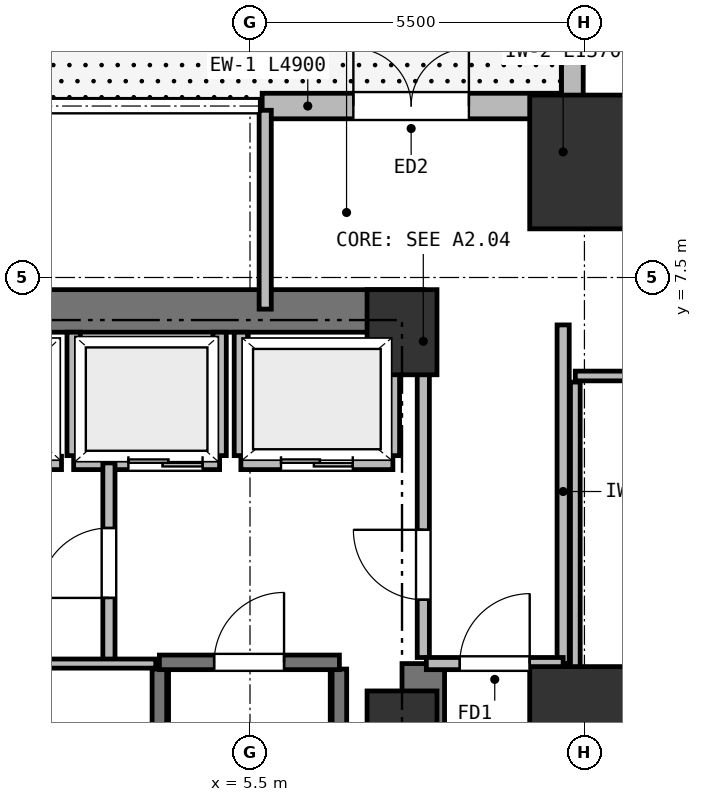
"""IFC4 building model, lengths in metres.
Left out: names, types, materials, properties, quantities, classifications, styles, units other than length and angle.
Written with IfcOpenShell. Run it as: python <this file> out.ifc"""

import sys

from ifc_helpers import new_model, si_unit, direction, frame, frame_2d, origin, origin_2d, place, context, subcontext, project, spatial, rectangle, extrude, element, fill, save


model = new_model("IFC4")
c1 = context("Model", 3, precision=1e-05, world=origin(), true_north=direction((0.0, 1.0)))
c2 = subcontext(c1, "Body", "Model", "MODEL_VIEW")
j1 = project(units=[si_unit("LENGTHUNIT", "METRE"), si_unit("PLANEANGLEUNIT", "RADIAN")], contexts=[c1])
p1 = place(None, origin())
s1 = spatial("IfcSite", under=j1, at=p1, CompositionType="ELEMENT")
p2 = place(p1, origin())
s2 = spatial("IfcBuilding", under=s1, at=p2, CompositionType="ELEMENT")
p3 = place(p2, origin())
s3 = spatial("IfcBuildingStorey", under=s2, at=p3, CompositionType="ELEMENT", Elevation=0.0)
for number, where, z_axis, x_axis in (
    (1, (8.0, 0.0, 0.0), (0.0, 0.0, 1.0), (1.0, 0.0, 0.0)),
    (2, (8.0, 6.6, 0.0), (0.0, 0.0, 1.0), (1.0, 0.0, 0.0)),
):
    element("IfcColumn", number, at=place(p3, frame(where, z_axis=z_axis, x_axis=x_axis)), inside=s3, PredefinedType="COLUMN", context=c2, shape_type="SweptSolid", body=[
        extrude(rectangle(XDim=1.15, YDim=1.4, at=origin_2d()), origin(), (0.0, 0.0, 1.0), 6.0),
    ])
p4 = place(p3, frame((-8.35, 6.95, 0.0), z_axis=(0.0, 0.0, 1.0), x_axis=(1.0, 0.0, 0.0)))
e3 = element("IfcWall", 3, at=p4, inside=s3, PredefinedType="SHEAR", context=c2, shape_type="SweptSolid", body=[
    extrude(rectangle(XDim=16.7, YDim=0.7, at=frame_2d((8.35, 0.0))), origin(), (0.0, 0.0, 1.0), 5.72),
])
p5 = place(p3, frame((8.35, -6.95, 0.0), z_axis=(0.0, 0.0, 1.0), x_axis=(0.0, 1.0, 0.0)))
e4 = element("IfcWall", 4, at=p5, inside=s3, PredefinedType="SHEAR", context=c2, shape_type="SweptSolid", body=[
    extrude(rectangle(XDim=8.1, YDim=0.7, at=frame_2d((4.05, 0.0))), origin(), (0.0, 0.0, 1.0), 5.72),
])
for number, where, z_axis, x_axis in (
    (5, (11.0, 0.0, 0.0), (0.0, 0.0, 1.0), (1.0, 0.0, 0.0)),
    (6, (11.0, 9.4, 0.0), (0.0, 0.0, 1.0), (1.0, 0.0, 0.0)),
):
    element("IfcColumn", number, at=place(p3, frame(where, z_axis=z_axis, x_axis=x_axis)), inside=s3, PredefinedType="COLUMN", context=c2, shape_type="SweptSolid", body=[
        extrude(rectangle(XDim=1.8, YDim=2.2, at=origin_2d()), origin(), (0.0, 0.0, 1.0), 6.0),
    ])
p6 = place(p3, frame((5.7, 10.32, 0.0), z_axis=(0.0, 0.0, 1.0), x_axis=(1.0, 0.0, 0.0)))
e7 = element("IfcWall", 7, at=p6, inside=s3, PredefinedType="SOLIDWALL", context=c2, shape_type="SweptSolid", body=[
    extrude(rectangle(XDim=4.9, YDim=0.42, at=frame_2d((2.45, 0.0))), origin(), (0.0, 0.0, 1.0), 5.72),
])
p7 = place(p6, frame((1.5, 0.0, 0.0)))
e8 = element("IfcOpeningElement", 8, at=p7, cuts=e7, PredefinedType="OPENING", context=c2, shape_type="SweptSolid", body=[
    extrude(rectangle(XDim=1.9, YDim=2.35, at=frame_2d((0.95, 1.175))), frame((0.0, 0.22, 0.0), z_axis=(0.0, -1.0, 0.0), x_axis=(1.0, 0.0, 0.0)), (0.0, 0.0, 1.0), 0.44),
])
p8 = place(p3, frame((10.8, 21.29, 0.0), z_axis=(0.0, 0.0, 1.0), x_axis=(0.0, -1.0, 0.0)))
e9 = element("IfcWall", 9, at=p8, inside=s3, PredefinedType="SOLIDWALL", context=c2, shape_type="SweptSolid", body=[
    extrude(rectangle(XDim=10.97, YDim=0.36, at=frame_2d((5.485, 0.0))), origin(), (0.0, 0.0, 1.0), 5.1),
])
for number, where, z_axis, x_axis in (
    (10, (4.01, -6.16, 0.0), (0.0, 0.0, 1.0), (0.0, 1.0, 0.0)),
    (11, (6.97, -6.16, 0.0), (0.0, 0.0, 1.0), (0.0, 1.0, 0.0)),
):
    element("IfcWall", number, at=place(p3, frame(where, z_axis=z_axis, x_axis=x_axis)), inside=s3, PredefinedType="SHEAR", context=c2, shape_type="SweptSolid", body=[
        extrude(rectangle(XDim=7.22, YDim=0.24, at=frame_2d((3.61, 0.0))), origin(), (0.0, 0.0, 1.0), 5.72),
    ])
p9 = place(p3, frame((4.01, 1.17, 0.0), z_axis=(0.0, 0.0, 1.0), x_axis=(1.0, 0.0, 0.0)))
e12 = element("IfcWall", 12, at=p9, inside=s3, PredefinedType="SHEAR", context=c2, shape_type="SweptSolid", body=[
    extrude(rectangle(XDim=2.96, YDim=0.24, at=frame_2d((1.48, 0.0))), origin(), (0.0, 0.0, 1.0), 5.72),
])
p10 = place(p9, frame((0.9, 0.0, 0.0)))
e13 = element("IfcOpeningElement", 13, at=p10, cuts=e12, PredefinedType="OPENING", context=c2, shape_type="SweptSolid", body=[
    extrude(rectangle(XDim=1.15, YDim=2.15, at=frame_2d((0.575, 1.075))), frame((0.0, 0.13, 0.0), z_axis=(0.0, -1.0, 0.0), x_axis=(1.0, 0.0, 0.0)), (0.0, 0.0, 1.0), 0.26),
])
p11 = place(p3, frame((5.35, 4.45, 0.0), z_axis=(0.0, 0.0, 1.0), x_axis=(1.0, 0.0, 0.0)))
e14 = element("IfcWall", 14, at=p11, inside=s3, PredefinedType="PARTITIONING", context=c2, shape_type="SweptSolid", body=[
    extrude(rectangle(XDim=2.5, YDim=0.22, at=frame_2d((1.25, 0.0))), origin(), (0.0, 0.0, 1.0), 5.72),
])
p12 = place(p11, frame((0.66, 0.0, 0.0)))
e15 = element("IfcOpeningElement", 15, at=p12, cuts=e14, PredefinedType="OPENING", context=c2, shape_type="SweptSolid", body=[
    extrude(rectangle(XDim=1.18, YDim=2.15, at=frame_2d((0.59, 1.075))), frame((0.0, 0.12, 0.0), z_axis=(0.0, -1.0, 0.0), x_axis=(1.0, 0.0, 0.0)), (0.0, 0.0, 1.0), 0.24),
])
p13 = place(p3, frame((5.35, 4.57, 0.0), z_axis=(0.0, 0.0, 1.0), x_axis=(0.0, 1.0, 0.0)))
e16 = element("IfcWall", 16, at=p13, inside=s3, PredefinedType="PARTITIONING", context=c2, shape_type="SweptSolid", body=[
    extrude(rectangle(XDim=2.03, YDim=0.22, at=frame_2d((1.015, 0.0))), origin(), (0.0, 0.0, 1.0), 5.72),
])
p14 = place(p3, frame((7.85, 4.57, 0.0), z_axis=(0.0, 0.0, 1.0), x_axis=(0.0, 1.0, 0.0)))
e17 = element("IfcWall", 17, at=p14, inside=s3, PredefinedType="PARTITIONING", context=c2, shape_type="SweptSolid", body=[
    extrude(rectangle(XDim=2.03, YDim=0.22, at=frame_2d((1.015, 0.0))), origin(), (0.0, 0.0, 1.0), 5.3),
])
p15 = place(p3, frame((2.6, 4.45, 0.0), z_axis=(0.0, 0.0, 1.0), x_axis=(1.0, 0.0, 0.0)))
e18 = element("IfcWall", 18, at=p15, inside=s3, PredefinedType="PARTITIONING", context=c2, shape_type="SweptSolid", body=[
    extrude(rectangle(XDim=2.4, YDim=0.22, at=frame_2d((1.2, 0.0))), origin(), (0.0, 0.0, 1.0), 5.72),
])
p16 = place(p15, frame((0.9, 0.0, 0.0)))
e19 = element("IfcOpeningElement", 19, at=p16, cuts=e18, PredefinedType="OPENING", context=c2, shape_type="SweptSolid", body=[
    extrude(rectangle(XDim=1.22, YDim=2.15, at=frame_2d((0.61, 1.075))), frame((0.0, 0.12, 0.0), z_axis=(0.0, -1.0, 0.0), x_axis=(1.0, 0.0, 0.0)), (0.0, 0.0, 1.0), 0.24),
])
for number, where, z_axis, x_axis in (
    (20, (2.6, 4.57, 0.0), (0.0, 0.0, 1.0), (0.0, 1.0, 0.0)),
    (21, (5.0, 4.57, 0.0), (0.0, 0.0, 1.0), (0.0, 1.0, 0.0)),
):
    element("IfcWall", number, at=place(p3, frame(where, z_axis=z_axis, x_axis=x_axis)), inside=s3, PredefinedType="PARTITIONING", context=c2, shape_type="SweptSolid", body=[
        extrude(rectangle(XDim=2.03, YDim=0.22, at=frame_2d((1.015, 0.0))), origin(), (0.0, 0.0, 1.0), 5.72),
    ])
p17 = place(p3, frame((0.2, 4.45, 0.0), z_axis=(0.0, 0.0, 1.0), x_axis=(1.0, 0.0, 0.0)))
e22 = element("IfcWall", 22, at=p17, inside=s3, PredefinedType="PARTITIONING", context=c2, shape_type="SweptSolid", body=[
    extrude(rectangle(XDim=2.2, YDim=0.22, at=frame_2d((1.1, 0.0))), origin(), (0.0, 0.0, 1.0), 5.72),
])
p18 = place(p17, frame((0.53, 0.0, 0.0)))
e23 = element("IfcOpeningElement", 23, at=p18, cuts=e22, PredefinedType="OPENING", context=c2, shape_type="SweptSolid", body=[
    extrude(rectangle(XDim=1.14, YDim=2.15, at=frame_2d((0.57, 1.075))), frame((0.0, 0.12, 0.0), z_axis=(0.0, -1.0, 0.0), x_axis=(1.0, 0.0, 0.0)), (0.0, 0.0, 1.0), 0.24),
])
p19 = place(p3, frame((3.18, 1.15, 0.0), z_axis=(0.0, 0.0, 1.0), x_axis=(0.0, 1.0, 0.0)))
e24 = element("IfcWall", 24, at=p19, inside=s3, PredefinedType="PARTITIONING", context=c2, shape_type="SweptSolid", body=[
    extrude(rectangle(XDim=3.3, YDim=0.2, at=frame_2d((1.65, 0.0))), origin(), (0.0, 0.0, 1.0), 5.72),
])
p20 = place(p19, frame((1.08, 0.0, 0.0)))
e25 = element("IfcOpeningElement", 25, at=p20, cuts=e24, PredefinedType="OPENING", context=c2, shape_type="SweptSolid", body=[
    extrude(rectangle(XDim=1.15, YDim=2.15, at=frame_2d((0.575, 1.075))), frame((0.0, 0.11, 0.0), z_axis=(0.0, -1.0, 0.0), x_axis=(1.0, 0.0, 0.0)), (0.0, 0.0, 1.0), 0.22),
])
p21 = place(p3, frame((8.35, 1.25, 0.0), z_axis=(0.0, 0.0, 1.0), x_axis=(0.0, 1.0, 0.0)))
e26 = element("IfcWall", 26, at=p21, inside=s3, PredefinedType="PARTITIONING", context=c2, shape_type="SweptSolid", body=[
    extrude(rectangle(XDim=5.3, YDim=0.2, at=frame_2d((2.65, 0.0))), origin(), (0.0, 0.0, 1.0), 5.72),
])
p22 = place(p21, frame((0.95, 0.0, 0.0)))
e27 = element("IfcOpeningElement", 27, at=p22, cuts=e26, PredefinedType="OPENING", context=c2, shape_type="SweptSolid", body=[
    extrude(rectangle(XDim=1.15, YDim=2.15, at=frame_2d((0.575, 1.075))), frame((0.0, 0.11, 0.0), z_axis=(0.0, -1.0, 0.0), x_axis=(1.0, 0.0, 0.0)), (0.0, 0.0, 1.0), 0.22),
])
p23 = place(p3, frame((3.95, 1.15, 0.0), z_axis=(0.0, 0.0, 1.0), x_axis=(-1.0, 0.0, 0.0)))
e28 = element("IfcWall", 28, at=p23, inside=s3, PredefinedType="PARTITIONING", context=c2, shape_type="SweptSolid", body=[
    extrude(rectangle(XDim=7.9, YDim=0.15, at=frame_2d((3.95, 0.0))), origin(), (0.0, 0.0, 1.0), 5.72),
])
p24 = place(p23, frame((5.34, 0.0, 0.0)))
e29 = element("IfcOpeningElement", 29, at=p24, cuts=e28, PredefinedType="OPENING", context=c2, shape_type="SweptSolid", body=[
    extrude(rectangle(XDim=0.92, YDim=2.05, at=frame_2d((0.46, 1.025))), frame((0.0, 0.085, 0.0), z_axis=(0.0, -1.0, 0.0), x_axis=(1.0, 0.0, 0.0)), (0.0, 0.0, 1.0), 0.17),
])
p25 = place(p23, frame((1.84, 0.0, 0.0)))
e30 = element("IfcOpeningElement", 30, at=p25, cuts=e28, PredefinedType="OPENING", context=c2, shape_type="SweptSolid", body=[
    extrude(rectangle(XDim=0.92, YDim=2.05, at=frame_2d((0.46, 1.025))), frame((0.0, 0.085, 0.0), z_axis=(0.0, -1.0, 0.0), x_axis=(1.0, 0.0, 0.0)), (0.0, 0.0, 1.0), 0.17),
])
p26 = place(p3, frame((27.6, 5.88, 0.0), z_axis=(0.0, 0.0, 1.0), x_axis=(-1.0, 0.0, 0.0)))
e31 = element("IfcWall", 31, at=p26, inside=s3, PredefinedType="PARTITIONING", context=c2, shape_type="SweptSolid", body=[
    extrude(rectangle(XDim=16.75, YDim=0.16, at=frame_2d((8.375, 0.0))), origin(), (0.0, 0.0, 1.0), 5.72),
])
p27 = place(p3, frame((10.85, 5.78, 0.0), z_axis=(0.0, 0.0, 1.0), x_axis=(0.0, -1.0, 0.0)))
e32 = element("IfcWall", 32, at=p27, inside=s3, PredefinedType="PARTITIONING", context=c2, shape_type="SweptSolid", body=[
    extrude(rectangle(XDim=11.56, YDim=0.16, at=frame_2d((5.78, 0.0))), origin(), (0.0, 0.0, 1.0), 5.1),
])
p28 = place(p27, frame((7.46, 0.0, 0.0)))
e33 = element("IfcOpeningElement", 33, at=p28, cuts=e32, PredefinedType="OPENING", context=c2, shape_type="SweptSolid", body=[
    extrude(rectangle(XDim=1.5, YDim=2.2, at=frame_2d((0.75, 1.1))), frame((0.0, 0.09, 0.0), z_axis=(0.0, -1.0, 0.0), x_axis=(1.0, 0.0, 0.0)), (0.0, 0.0, 1.0), 0.18),
])
p29 = place(p3, frame((11.05, 8.92, 0.0), z_axis=(0.0, 0.0, 1.0), x_axis=(1.0, 0.0, 0.0)))
e34 = element("IfcWall", 34, at=p29, inside=s3, PredefinedType="PARTITIONING", context=c2, shape_type="SweptSolid", body=[
    extrude(rectangle(XDim=10.55, YDim=0.2, at=frame_2d((5.275, 0.0))), origin(), (0.0, 0.0, 1.0), 5.72),
])
p30 = place(p29, frame((3.86, 0.0, 0.0)))
e35 = element("IfcOpeningElement", 35, at=p30, cuts=e34, PredefinedType="OPENING", context=c2, shape_type="SweptSolid", body=[
    extrude(rectangle(XDim=1.8, YDim=2.2, at=frame_2d((0.9, 1.1))), frame((0.0, 0.11, 0.0), z_axis=(0.0, -1.0, 0.0), x_axis=(1.0, 0.0, 0.0)), (0.0, 0.0, 1.0), 0.22),
])
p31 = place(p3, frame((5.75, 10.25, 0.0), z_axis=(0.0, 0.0, 1.0), x_axis=(0.0, -1.0, 0.0)))
e36 = element("IfcWall", 36, at=p31, inside=s3, PredefinedType="PARTITIONING", context=c2, shape_type="SweptSolid", body=[
    extrude(rectangle(XDim=3.27, YDim=0.2, at=frame_2d((1.635, 0.0))), origin(), (0.0, 0.0, 1.0), 5.72),
])
p32 = place(p3, frame((10.65, 8.88, 0.0), z_axis=(0.0, 0.0, 1.0), x_axis=(0.0, 1.0, 0.0)))
e37 = element("IfcWall", 37, at=p32, inside=s3, PredefinedType="PARTITIONING", context=c2, shape_type="SweptSolid", body=[
    extrude(rectangle(XDim=1.37, YDim=0.2, at=frame_2d((0.685, 0.0))), origin(), (0.0, 0.0, 1.0), 5.72),
])
p33 = place(p3, frame((10.65, 1.15, 0.0), z_axis=(0.0, 0.0, 1.0), x_axis=(0.0, 1.0, 0.0)))
e38 = element("IfcWall", 38, at=p33, inside=s3, PredefinedType="PARTITIONING", context=c2, shape_type="SweptSolid", body=[
    extrude(rectangle(XDim=5.57, YDim=0.2, at=frame_2d((2.785, 0.0))), origin(), (0.0, 0.0, 1.0), 5.72),
])
p34 = place(p3, frame((8.4, 1.15, 0.0), z_axis=(0.0, 0.0, 1.0), x_axis=(1.0, 0.0, 0.0)))
e39 = element("IfcWall", 39, at=p34, inside=s3, PredefinedType="PARTITIONING", context=c2, shape_type="SweptSolid", body=[
    extrude(rectangle(XDim=2.25, YDim=0.2, at=frame_2d((1.125, 0.0))), origin(), (0.0, 0.0, 1.0), 5.72),
])
p35 = place(p34, frame((0.55, 0.0, 0.0)))
e40 = element("IfcOpeningElement", 40, at=p35, cuts=e39, PredefinedType="OPENING", context=c2, shape_type="SweptSolid", body=[
    extrude(rectangle(XDim=1.15, YDim=2.15, at=frame_2d((0.575, 1.075))), frame((0.0, 0.11, 0.0), z_axis=(0.0, -1.0, 0.0), x_axis=(1.0, 0.0, 0.0)), (0.0, 0.0, 1.0), 0.22),
])
p36 = place(p7, origin())
e41 = element("IfcDoor", 41, at=p36, inside=s3, OperationType="DOUBLE_DOOR_SINGLE_SWING", PredefinedType="DOOR", context=c2, shape_type="SweptSolid", body=[
    extrude(rectangle(XDim=1.9, YDim=2.35, at=frame_2d((0.95, 1.175))), frame((0.0, 0.025, 0.0), z_axis=(0.0, -1.0, 0.0), x_axis=(1.0, 0.0, 0.0)), (0.0, 0.0, 1.0), 0.05),
])
fill(e8, e41)
p37 = place(p10, origin())
e42 = element("IfcDoor", 42, at=p37, inside=s3, OperationType="SINGLE_SWING_RIGHT", PredefinedType="DOOR", context=c2, shape_type="SweptSolid", body=[
    extrude(rectangle(XDim=1.15, YDim=2.15, at=frame_2d((0.575, 1.075))), frame((0.0, 0.025, 0.0), z_axis=(0.0, -1.0, 0.0), x_axis=(1.0, 0.0, 0.0)), (0.0, 0.0, 1.0), 0.05),
])
fill(e13, e42)
p38 = place(p12, origin())
e43 = element("IfcDoor", 43, at=p38, inside=s3, OperationType="DOUBLE_DOOR_SLIDING", PredefinedType="DOOR", context=c2, shape_type="SweptSolid", body=[
    extrude(rectangle(XDim=1.18, YDim=2.15, at=frame_2d((0.59, 1.075))), frame((0.0, 0.025, 0.0), z_axis=(0.0, -1.0, 0.0), x_axis=(1.0, 0.0, 0.0)), (0.0, 0.0, 1.0), 0.05),
])
fill(e15, e43)
p39 = place(p16, origin())
e44 = element("IfcDoor", 44, at=p39, inside=s3, OperationType="DOUBLE_DOOR_SLIDING", PredefinedType="DOOR", context=c2, shape_type="SweptSolid", body=[
    extrude(rectangle(XDim=1.22, YDim=2.15, at=frame_2d((0.61, 1.075))), frame((0.0, 0.025, 0.0), z_axis=(0.0, -1.0, 0.0), x_axis=(1.0, 0.0, 0.0)), (0.0, 0.0, 1.0), 0.05),
])
fill(e19, e44)
p40 = place(p20, origin())
e45 = element("IfcDoor", 45, at=p40, inside=s3, OperationType="SINGLE_SWING_LEFT", PredefinedType="DOOR", context=c2, shape_type="SweptSolid", body=[
    extrude(rectangle(XDim=1.15, YDim=2.15, at=frame_2d((0.575, 1.075))), frame((0.0, 0.025, 0.0), z_axis=(0.0, -1.0, 0.0), x_axis=(1.0, 0.0, 0.0)), (0.0, 0.0, 1.0), 0.05),
])
fill(e25, e45)
p41 = place(p22, origin())
e46 = element("IfcDoor", 46, at=p41, inside=s3, OperationType="SINGLE_SWING_RIGHT", PredefinedType="DOOR", context=c2, shape_type="SweptSolid", body=[
    extrude(rectangle(XDim=1.15, YDim=2.15, at=frame_2d((0.575, 1.075))), frame((0.0, 0.025, 0.0), z_axis=(0.0, -1.0, 0.0), x_axis=(1.0, 0.0, 0.0)), (0.0, 0.0, 1.0), 0.05),
])
fill(e27, e46)
p42 = place(p35, origin())
e47 = element("IfcDoor", 47, at=p42, inside=s3, OperationType="SINGLE_SWING_RIGHT", PredefinedType="DOOR", context=c2, shape_type="SweptSolid", body=[
    extrude(rectangle(XDim=1.15, YDim=2.15, at=frame_2d((0.575, 1.075))), frame((0.0, 0.025, 0.0), z_axis=(0.0, -1.0, 0.0), x_axis=(1.0, 0.0, 0.0)), (0.0, 0.0, 1.0), 0.05),
])
fill(e40, e47)
save(model, sys.argv[1])
